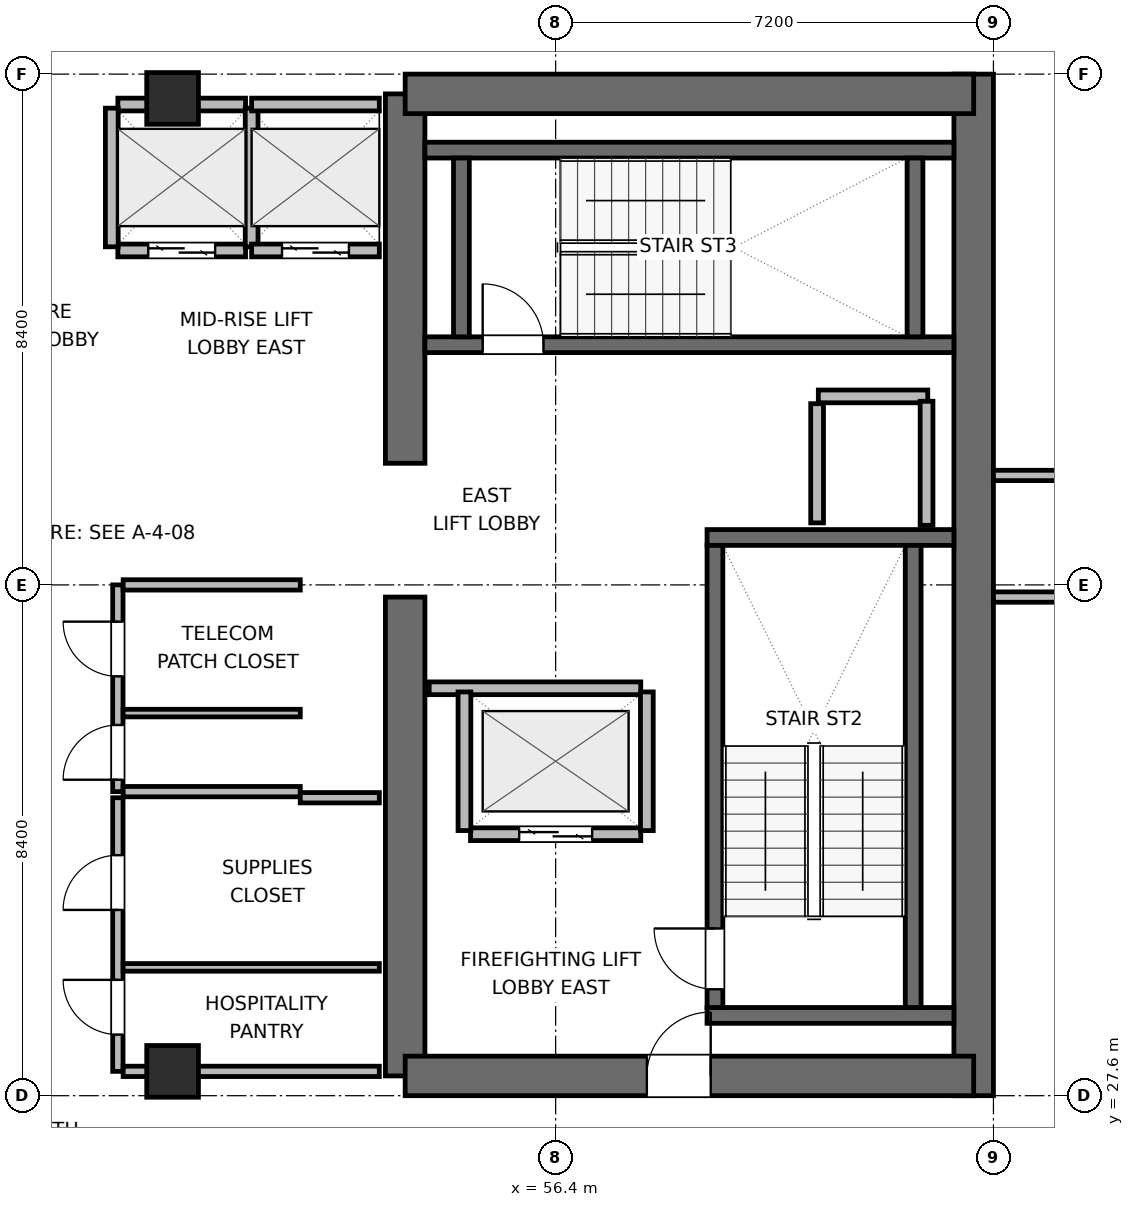
"""IFC4 building model, lengths in metres.
Left out: names, types, materials, properties, quantities, classifications, styles, units other than length and angle.
Written with IfcOpenShell. Run it as: python <this file> out.ifc"""

import sys

from ifc_helpers import new_model, si_unit, direction, frame, frame_2d, origin, origin_2d, place, context, subcontext, project, spatial, rectangle, extrude, element, fill, save


model = new_model("IFC4")
c1 = context("Model", 3, precision=1e-05, world=origin(), true_north=direction((0.0, 1.0)))
c2 = subcontext(c1, "Body", "Model", "MODEL_VIEW")
j1 = project(units=[si_unit("LENGTHUNIT", "METRE"), si_unit("PLANEANGLEUNIT", "RADIAN")], contexts=[c1])
p1 = place(None, origin())
s1 = spatial("IfcSite", under=j1, at=p1, CompositionType="ELEMENT")
p2 = place(p1, origin())
s2 = spatial("IfcBuilding", under=s1, at=p2, CompositionType="ELEMENT")
p3 = place(p2, frame((0.0, 0.0, 201.9)))
s3 = spatial("IfcBuildingStorey", under=s2, at=p3, CompositionType="ELEMENT", Elevation=201.9)
p4 = place(p3, frame((53.925, 27.925, 0.0), z_axis=(0.0, 0.0, 1.0), x_axis=(0.0, 1.0, 0.0)))
e1 = element("IfcWall", 1, at=p4, inside=s3, PredefinedType="SHEAR", context=c2, shape_type="SweptSolid", body=[
    extrude(rectangle(XDim=7.875, YDim=0.65, at=frame_2d((3.938, 0.0))), origin(), (0.0, 0.0, 1.0), 3.9),
])
p5 = place(p3, frame((53.925, 38.0, 0.0), z_axis=(0.0, 0.0, 1.0), x_axis=(0.0, 1.0, 0.0)))
e2 = element("IfcWall", 2, at=p5, inside=s3, PredefinedType="SHEAR", context=c2, shape_type="SweptSolid", body=[
    extrude(rectangle(XDim=6.075, YDim=0.65, at=frame_2d((3.038, 0.0))), origin(), (0.0, 0.0, 1.0), 3.9),
])
p6 = place(p3, frame((63.275, 27.6, 0.0), z_axis=(0.0, 0.0, 1.0), x_axis=(0.0, 1.0, 0.0)))
e3 = element("IfcWall", 3, at=p6, inside=s3, PredefinedType="SHEAR", context=c2, shape_type="SweptSolid", body=[
    extrude(rectangle(XDim=16.8, YDim=0.65, at=frame_2d((8.4, 0.0))), origin(), (0.0, 0.0, 1.0), 3.9),
])
p7 = place(p3, frame((53.925, 27.925, 0.0), z_axis=(0.0, 0.0, 1.0), x_axis=(1.0, 0.0, 0.0)))
e4 = element("IfcWall", 4, at=p7, inside=s3, PredefinedType="SHEAR", context=c2, shape_type="SweptSolid", body=[
    extrude(rectangle(XDim=9.35, YDim=0.65, at=frame_2d((4.675, 0.0))), origin(), (0.0, 0.0, 1.0), 3.9),
])
p8 = place(p7, frame((3.975, 0.0, 0.0)))
e5 = element("IfcOpeningElement", 5, at=p8, cuts=e4, PredefinedType="OPENING", context=c2, shape_type="SweptSolid", body=[
    extrude(rectangle(XDim=1.05, YDim=2.04, at=frame_2d((0.525, 1.02))), frame((0.0, 0.335, 0.0), z_axis=(0.0, -1.0, 0.0), x_axis=(1.0, 0.0, 0.0)), (0.0, 0.0, 1.0), 0.67),
])
p9 = place(p3, frame((53.925, 44.075, 0.0), z_axis=(0.0, 0.0, 1.0), x_axis=(1.0, 0.0, 0.0)))
e6 = element("IfcWall", 6, at=p9, inside=s3, PredefinedType="SHEAR", context=c2, shape_type="SweptSolid", body=[
    extrude(rectangle(XDim=9.35, YDim=0.65, at=frame_2d((4.675, 0.0))), origin(), (0.0, 0.0, 1.0), 3.9),
])
for number, where, z_axis, x_axis in (
    (7, (58.89, 28.92, 0.0), (0.0, 0.0, 1.0), (1.0, 0.0, 0.0)),
    (8, (58.89, 36.78, 0.0), (0.0, 0.0, 1.0), (1.0, 0.0, 0.0)),
):
    element("IfcWall", number, at=place(p3, frame(where, z_axis=z_axis, x_axis=x_axis)), inside=s3, PredefinedType="SHEAR", context=c2, shape_type="SweptSolid", body=[
        extrude(rectangle(XDim=4.06, YDim=0.26, at=frame_2d((2.03, 0.0))), origin(), (0.0, 0.0, 1.0), 3.9),
    ])
p10 = place(p3, frame((59.02, 29.05, 0.0), z_axis=(0.0, 0.0, 1.0), x_axis=(0.0, 1.0, 0.0)))
e9 = element("IfcWall", 9, at=p10, inside=s3, PredefinedType="SHEAR", context=c2, shape_type="SweptSolid", body=[
    extrude(rectangle(XDim=7.6, YDim=0.26, at=frame_2d((3.8, 0.0))), origin(), (0.0, 0.0, 1.0), 3.9),
])
p11 = place(p10, frame((0.3, 0.0, 0.0)))
e10 = element("IfcOpeningElement", 10, at=p11, cuts=e9, PredefinedType="OPENING", context=c2, shape_type="SweptSolid", body=[
    extrude(rectangle(XDim=1.0, YDim=2.04, at=frame_2d((0.5, 1.02))), frame((0.0, 0.14, 0.0), z_axis=(0.0, -1.0, 0.0), x_axis=(1.0, 0.0, 0.0)), (0.0, 0.0, 1.0), 0.28),
])
p12 = place(p3, frame((62.28, 29.05, 0.0), z_axis=(0.0, 0.0, 1.0), x_axis=(0.0, 1.0, 0.0)))
e11 = element("IfcWall", 11, at=p12, inside=s3, PredefinedType="SHEAR", context=c2, shape_type="SweptSolid", body=[
    extrude(rectangle(XDim=7.6, YDim=0.26, at=frame_2d((3.8, 0.0))), origin(), (0.0, 0.0, 1.0), 3.9),
])
p13 = place(p3, frame((54.25, 39.95, 0.0), z_axis=(0.0, 0.0, 1.0), x_axis=(1.0, 0.0, 0.0)))
e12 = element("IfcWall", 12, at=p13, inside=s3, PredefinedType="SHEAR", context=c2, shape_type="SweptSolid", body=[
    extrude(rectangle(XDim=8.7, YDim=0.26, at=frame_2d((4.35, 0.0))), origin(), (0.0, 0.0, 1.0), 3.9),
])
p14 = place(p13, frame((0.95, 0.0, 0.0)))
e13 = element("IfcOpeningElement", 13, at=p14, cuts=e12, PredefinedType="OPENING", context=c2, shape_type="SweptSolid", body=[
    extrude(rectangle(XDim=1.0, YDim=2.04, at=frame_2d((0.5, 1.02))), frame((0.0, 0.14, 0.0), z_axis=(0.0, -1.0, 0.0), x_axis=(1.0, 0.0, 0.0)), (0.0, 0.0, 1.0), 0.28),
])
p15 = place(p3, frame((54.25, 43.15, 0.0), z_axis=(0.0, 0.0, 1.0), x_axis=(1.0, 0.0, 0.0)))
e14 = element("IfcWall", 14, at=p15, inside=s3, PredefinedType="SHEAR", context=c2, shape_type="SweptSolid", body=[
    extrude(rectangle(XDim=8.7, YDim=0.26, at=frame_2d((4.35, 0.0))), origin(), (0.0, 0.0, 1.0), 3.9),
])
for number, where, z_axis, x_axis in (
    (15, (54.85, 40.08, 0.0), (0.0, 0.0, 1.0), (0.0, 1.0, 0.0)),
    (16, (62.31, 40.08, 0.0), (0.0, 0.0, 1.0), (0.0, 1.0, 0.0)),
):
    element("IfcWall", number, at=place(p3, frame(where, z_axis=z_axis, x_axis=x_axis)), inside=s3, PredefinedType="SHEAR", context=c2, shape_type="SweptSolid", body=[
        extrude(rectangle(XDim=2.94, YDim=0.26, at=frame_2d((1.47, 0.0))), origin(), (0.0, 0.0, 1.0), 3.9),
    ])
for number, where, z_axis, x_axis in (
    (17, (50.1, 28.0, 0.0), (0.0, 0.0, 1.0), (1.0, 0.0, 0.0)),
    (18, (50.1, 44.0, 0.0), (0.0, 0.0, 1.0), (1.0, 0.0, 0.0)),
):
    element("IfcColumn", number, at=place(p3, frame(where, z_axis=z_axis, x_axis=x_axis)), inside=s3, PredefinedType="COLUMN", context=c2, shape_type="SweptSolid", body=[
        extrude(rectangle(XDim=0.85, YDim=0.85, at=origin_2d()), origin(), (0.0, 0.0, 1.0), 3.9),
    ])
p16 = place(p3, frame((60.72, 39.1, 0.0), z_axis=(0.0, 0.0, 1.0), x_axis=(1.0, 0.0, 0.0)))
e19 = element("IfcWall", 19, at=p16, inside=s3, PredefinedType="PARTITIONING", context=c2, shape_type="SweptSolid", body=[
    extrude(rectangle(XDim=1.8, YDim=0.21, at=frame_2d((0.9, 0.0))), origin(), (0.0, 0.0, 1.0), 3.68),
])
p17 = place(p3, frame((60.7, 37.02, 0.0), z_axis=(0.0, 0.0, 1.0), x_axis=(0.0, 1.0, 0.0)))
e20 = element("IfcWall", 20, at=p17, inside=s3, PredefinedType="PARTITIONING", context=c2, shape_type="SweptSolid", body=[
    extrude(rectangle(XDim=1.96, YDim=0.21, at=frame_2d((0.98, 0.0))), origin(), (0.0, 0.0, 1.0), 3.68),
])
p18 = place(p3, frame((62.5, 36.98, 0.0), z_axis=(0.0, 0.0, 1.0), x_axis=(0.0, 1.0, 0.0)))
e21 = element("IfcWall", 21, at=p18, inside=s3, PredefinedType="PARTITIONING", context=c2, shape_type="SweptSolid", body=[
    extrude(rectangle(XDim=2.04, YDim=0.21, at=frame_2d((1.02, 0.0))), origin(), (0.0, 0.0, 1.0), 3.68),
])
p19 = place(p3, frame((55.0, 31.9, 0.0), z_axis=(0.0, 0.0, 1.0), x_axis=(1.0, 0.0, 0.0)))
e22 = element("IfcWall", 22, at=p19, inside=s3, PredefinedType="PARTITIONING", context=c2, shape_type="SweptSolid", body=[
    extrude(rectangle(XDim=2.8, YDim=0.21, at=frame_2d((1.4, 0.0))), origin(), (0.0, 0.0, 1.0), 3.68),
])
p20 = place(p19, frame((0.8, 0.0, 0.0)))
e23 = element("IfcOpeningElement", 23, at=p20, cuts=e22, PredefinedType="OPENING", context=c2, shape_type="SweptSolid", body=[
    extrude(rectangle(XDim=1.2, YDim=2.04, at=frame_2d((0.6, 1.02))), frame((0.0, 0.115, 0.0), z_axis=(0.0, -1.0, 0.0), x_axis=(1.0, 0.0, 0.0)), (0.0, 0.0, 1.0), 0.23),
])
p21 = place(p3, frame((54.32, 34.3, 0.0), z_axis=(0.0, 0.0, 1.0), x_axis=(1.0, 0.0, 0.0)))
e24 = element("IfcWall", 24, at=p21, inside=s3, PredefinedType="PARTITIONING", context=c2, shape_type="SweptSolid", body=[
    extrude(rectangle(XDim=3.48, YDim=0.21, at=frame_2d((1.74, 0.0))), origin(), (0.0, 0.0, 1.0), 3.68),
])
for number, where, z_axis, x_axis in (
    (25, (54.9, 31.96, 0.0), (0.0, 0.0, 1.0), (0.0, 1.0, 0.0)),
    (26, (57.9, 31.96, 0.0), (0.0, 0.0, 1.0), (0.0, 1.0, 0.0)),
):
    element("IfcWall", number, at=place(p3, frame(where, z_axis=z_axis, x_axis=x_axis)), inside=s3, PredefinedType="PARTITIONING", context=c2, shape_type="SweptSolid", body=[
        extrude(rectangle(XDim=2.28, YDim=0.21, at=frame_2d((1.14, 0.0))), origin(), (0.0, 0.0, 1.0), 3.68),
    ])
p22 = place(p3, frame((49.2, 41.5, 0.0), z_axis=(0.0, 0.0, 1.0), x_axis=(1.0, 0.0, 0.0)))
e27 = element("IfcWall", 27, at=p22, inside=s3, PredefinedType="PARTITIONING", context=c2, shape_type="SweptSolid", body=[
    extrude(rectangle(XDim=2.1, YDim=0.21, at=frame_2d((1.05, 0.0))), origin(), (0.0, 0.0, 1.0), 3.68),
])
p23 = place(p22, frame((0.5, 0.0, 0.0)))
e28 = element("IfcOpeningElement", 28, at=p23, cuts=e27, PredefinedType="OPENING", context=c2, shape_type="SweptSolid", body=[
    extrude(rectangle(XDim=1.1, YDim=2.04, at=frame_2d((0.55, 1.02))), frame((0.0, 0.115, 0.0), z_axis=(0.0, -1.0, 0.0), x_axis=(1.0, 0.0, 0.0)), (0.0, 0.0, 1.0), 0.23),
])
p24 = place(p3, frame((49.2, 43.9, 0.0), z_axis=(0.0, 0.0, 1.0), x_axis=(1.0, 0.0, 0.0)))
e29 = element("IfcWall", 29, at=p24, inside=s3, PredefinedType="PARTITIONING", context=c2, shape_type="SweptSolid", body=[
    extrude(rectangle(XDim=2.1, YDim=0.21, at=frame_2d((1.05, 0.0))), origin(), (0.0, 0.0, 1.0), 2.765),
])
for number, where, z_axis, x_axis in (
    (30, (49.1, 41.56, 0.0), (0.0, 0.0, 1.0), (0.0, 1.0, 0.0)),
    (31, (51.4, 41.56, 0.0), (0.0, 0.0, 1.0), (0.0, 1.0, 0.0)),
):
    element("IfcWall", number, at=place(p3, frame(where, z_axis=z_axis, x_axis=x_axis)), inside=s3, PredefinedType="PARTITIONING", context=c2, shape_type="SweptSolid", body=[
        extrude(rectangle(XDim=2.28, YDim=0.21, at=frame_2d((1.14, 0.0))), origin(), (0.0, 0.0, 1.0), 3.68),
    ])
p25 = place(p3, frame((51.4, 41.5, 0.0), z_axis=(0.0, 0.0, 1.0), x_axis=(1.0, 0.0, 0.0)))
e32 = element("IfcWall", 32, at=p25, inside=s3, PredefinedType="PARTITIONING", context=c2, shape_type="SweptSolid", body=[
    extrude(rectangle(XDim=2.1, YDim=0.21, at=frame_2d((1.05, 0.0))), origin(), (0.0, 0.0, 1.0), 3.68),
])
p26 = place(p25, frame((0.5, 0.0, 0.0)))
e33 = element("IfcOpeningElement", 33, at=p26, cuts=e32, PredefinedType="OPENING", context=c2, shape_type="SweptSolid", body=[
    extrude(rectangle(XDim=1.1, YDim=2.04, at=frame_2d((0.55, 1.02))), frame((0.0, 0.115, 0.0), z_axis=(0.0, -1.0, 0.0), x_axis=(1.0, 0.0, 0.0)), (0.0, 0.0, 1.0), 0.23),
])
p27 = place(p3, frame((51.4, 43.9, 0.0), z_axis=(0.0, 0.0, 1.0), x_axis=(1.0, 0.0, 0.0)))
e34 = element("IfcWall", 34, at=p27, inside=s3, PredefinedType="PARTITIONING", context=c2, shape_type="SweptSolid", body=[
    extrude(rectangle(XDim=2.1, YDim=0.21, at=frame_2d((1.05, 0.0))), origin(), (0.0, 0.0, 1.0), 2.765),
])
p28 = place(p3, frame((49.2, 32.6, 0.0), z_axis=(0.0, 0.0, 1.0), x_axis=(0.0, 1.0, 0.0)))
e35 = element("IfcWall", 35, at=p28, inside=s3, PredefinedType="PARTITIONING", context=c2, shape_type="SweptSolid", body=[
    extrude(rectangle(XDim=3.4, YDim=0.17, at=frame_2d((1.7, 0.0))), origin(), (0.0, 0.0, 1.0), 3.68),
])
p29 = place(p28, frame((0.196, 0.0, 0.0)))
e36 = element("IfcOpeningElement", 36, at=p29, cuts=e35, PredefinedType="OPENING", context=c2, shape_type="SweptSolid", body=[
    extrude(rectangle(XDim=0.9, YDim=2.02, at=frame_2d((0.45, 1.01))), frame((0.0, 0.095, 0.0), z_axis=(0.0, -1.0, 0.0), x_axis=(1.0, 0.0, 0.0)), (0.0, 0.0, 1.0), 0.19),
])
p30 = place(p28, frame((1.896, 0.0, 0.0)))
e37 = element("IfcOpeningElement", 37, at=p30, cuts=e35, PredefinedType="OPENING", context=c2, shape_type="SweptSolid", body=[
    extrude(rectangle(XDim=0.9, YDim=2.02, at=frame_2d((0.45, 1.01))), frame((0.0, 0.095, 0.0), z_axis=(0.0, -1.0, 0.0), x_axis=(1.0, 0.0, 0.0)), (0.0, 0.0, 1.0), 0.19),
])
for number, where, z_axis, x_axis in (
    (38, (49.287, 32.6, 0.0), (0.0, 0.0, 1.0), (1.0, 0.0, 0.0)),
    (39, (49.287, 36.0, 0.0), (0.0, 0.0, 1.0), (1.0, 0.0, 0.0)),
):
    element("IfcWall", number, at=place(p3, frame(where, z_axis=z_axis, x_axis=x_axis)), inside=s3, PredefinedType="PARTITIONING", context=c2, shape_type="SweptSolid", body=[
        extrude(rectangle(XDim=2.913, YDim=0.17, at=frame_2d((1.457, 0.0))), origin(), (0.0, 0.0, 1.0), 3.68),
    ])
p31 = place(p3, frame((49.287, 33.892, 0.0), z_axis=(0.0, 0.0, 1.0), x_axis=(1.0, 0.0, 0.0)))
e40 = element("IfcWall", 40, at=p31, inside=s3, PredefinedType="PARTITIONING", context=c2, shape_type="SweptSolid", body=[
    extrude(rectangle(XDim=2.913, YDim=0.125, at=frame_2d((1.457, 0.0))), origin(), (0.0, 0.0, 1.0), 3.68),
])
p32 = place(p3, frame((49.2, 28.0, 0.0), z_axis=(0.0, 0.0, 1.0), x_axis=(0.0, 1.0, 0.0)))
e41 = element("IfcWall", 41, at=p32, inside=s3, PredefinedType="PARTITIONING", context=c2, shape_type="SweptSolid", body=[
    extrude(rectangle(XDim=4.5, YDim=0.17, at=frame_2d((2.25, 0.0))), origin(), (0.0, 0.0, 1.0), 3.68),
])
p33 = place(p32, frame((0.605, 0.0, 0.0)))
e42 = element("IfcOpeningElement", 42, at=p33, cuts=e41, PredefinedType="OPENING", context=c2, shape_type="SweptSolid", body=[
    extrude(rectangle(XDim=0.9, YDim=2.02, at=frame_2d((0.45, 1.01))), frame((0.0, 0.095, 0.0), z_axis=(0.0, -1.0, 0.0), x_axis=(1.0, 0.0, 0.0)), (0.0, 0.0, 1.0), 0.19),
])
p34 = place(p32, frame((2.655, 0.0, 0.0)))
e43 = element("IfcOpeningElement", 43, at=p34, cuts=e41, PredefinedType="OPENING", context=c2, shape_type="SweptSolid", body=[
    extrude(rectangle(XDim=0.9, YDim=2.02, at=frame_2d((0.45, 1.01))), frame((0.0, 0.095, 0.0), z_axis=(0.0, -1.0, 0.0), x_axis=(1.0, 0.0, 0.0)), (0.0, 0.0, 1.0), 0.19),
])
p35 = place(p3, frame((49.287, 28.0, 0.0), z_axis=(0.0, 0.0, 1.0), x_axis=(1.0, 0.0, 0.0)))
e44 = element("IfcWall", 44, at=p35, inside=s3, PredefinedType="PARTITIONING", context=c2, shape_type="SweptSolid", body=[
    extrude(rectangle(XDim=4.213, YDim=0.17, at=frame_2d((2.106, 0.0))), origin(), (0.0, 0.0, 1.0), 2.765),
])
p36 = place(p3, frame((52.2, 32.5, 0.0), z_axis=(0.0, 0.0, 1.0), x_axis=(1.0, 0.0, 0.0)))
e45 = element("IfcWall", 45, at=p36, inside=s3, PredefinedType="PARTITIONING", context=c2, shape_type="SweptSolid", body=[
    extrude(rectangle(XDim=1.3, YDim=0.17, at=frame_2d((0.65, 0.0))), origin(), (0.0, 0.0, 1.0), 3.68),
])
p37 = place(p3, frame((49.287, 29.71, 0.0), z_axis=(0.0, 0.0, 1.0), x_axis=(1.0, 0.0, 0.0)))
e46 = element("IfcWall", 46, at=p37, inside=s3, PredefinedType="PARTITIONING", context=c2, shape_type="SweptSolid", body=[
    extrude(rectangle(XDim=4.213, YDim=0.125, at=frame_2d((2.106, 0.0))), origin(), (0.0, 0.0, 1.0), 3.68),
])
p38 = place(p3, frame((63.6, 35.8, 0.0), z_axis=(0.0, 0.0, 1.0), x_axis=(1.0, 0.0, 0.0)))
e47 = element("IfcWall", 47, at=p38, inside=s3, PredefinedType="PARTITIONING", context=c2, shape_type="SweptSolid", body=[
    extrude(rectangle(XDim=6.975, YDim=0.17, at=frame_2d((3.487, 0.0))), origin(), (0.0, 0.0, 1.0), 3.043),
])
p39 = place(p38, frame((1.1, 0.0, 0.0)))
e48 = element("IfcOpeningElement", 48, at=p39, cuts=e47, PredefinedType="OPENING", context=c2, shape_type="SweptSolid", body=[
    extrude(rectangle(XDim=0.95, YDim=2.04, at=frame_2d((0.475, 1.02))), frame((0.0, 0.095, 0.0), z_axis=(0.0, -1.0, 0.0), x_axis=(1.0, 0.0, 0.0)), (0.0, 0.0, 1.0), 0.19),
])
p40 = place(p3, frame((63.6, 37.8, 0.0), z_axis=(0.0, 0.0, 1.0), x_axis=(1.0, 0.0, 0.0)))
e49 = element("IfcWall", 49, at=p40, inside=s3, PredefinedType="PARTITIONING", context=c2, shape_type="SweptSolid", body=[
    extrude(rectangle(XDim=4.96, YDim=0.17, at=frame_2d((2.48, 0.0))), origin(), (0.0, 0.0, 1.0), 3.68),
])
p41 = place(p40, frame((1.1, 0.0, 0.0)))
e50 = element("IfcOpeningElement", 50, at=p41, cuts=e49, PredefinedType="OPENING", context=c2, shape_type="SweptSolid", body=[
    extrude(rectangle(XDim=0.95, YDim=2.04, at=frame_2d((0.475, 1.02))), frame((0.0, 0.095, 0.0), z_axis=(0.0, -1.0, 0.0), x_axis=(1.0, 0.0, 0.0)), (0.0, 0.0, 1.0), 0.19),
])
p42 = place(p11, origin())
e51 = element("IfcDoor", 51, at=p42, inside=s3, OperationType="SINGLE_SWING_RIGHT", PredefinedType="DOOR", context=c2, shape_type="SweptSolid", body=[
    extrude(rectangle(XDim=1.0, YDim=2.04, at=frame_2d((0.5, 1.02))), frame((0.0, 0.025, 0.0), z_axis=(0.0, -1.0, 0.0), x_axis=(1.0, 0.0, 0.0)), (0.0, 0.0, 1.0), 0.05),
])
fill(e10, e51)
p43 = place(p14, origin())
e52 = element("IfcDoor", 52, at=p43, inside=s3, OperationType="SINGLE_SWING_LEFT", PredefinedType="DOOR", context=c2, shape_type="SweptSolid", body=[
    extrude(rectangle(XDim=1.0, YDim=2.04, at=frame_2d((0.5, 1.02))), frame((0.0, 0.025, 0.0), z_axis=(0.0, -1.0, 0.0), x_axis=(1.0, 0.0, 0.0)), (0.0, 0.0, 1.0), 0.05),
])
fill(e13, e52)
p44 = place(p20, origin())
e53 = element("IfcDoor", 53, at=p44, inside=s3, OperationType="DOUBLE_DOOR_SLIDING", PredefinedType="DOOR", context=c2, shape_type="SweptSolid", body=[
    extrude(rectangle(XDim=1.2, YDim=2.04, at=frame_2d((0.6, 1.02))), frame((0.0, 0.025, 0.0), z_axis=(0.0, -1.0, 0.0), x_axis=(1.0, 0.0, 0.0)), (0.0, 0.0, 1.0), 0.05),
])
fill(e23, e53)
p45 = place(p23, origin())
e54 = element("IfcDoor", 54, at=p45, inside=s3, OperationType="DOUBLE_DOOR_SLIDING", PredefinedType="DOOR", context=c2, shape_type="SweptSolid", body=[
    extrude(rectangle(XDim=1.1, YDim=2.04, at=frame_2d((0.55, 1.02))), frame((0.0, 0.025, 0.0), z_axis=(0.0, -1.0, 0.0), x_axis=(1.0, 0.0, 0.0)), (0.0, 0.0, 1.0), 0.05),
])
fill(e28, e54)
p46 = place(p26, origin())
e55 = element("IfcDoor", 55, at=p46, inside=s3, OperationType="DOUBLE_DOOR_SLIDING", PredefinedType="DOOR", context=c2, shape_type="SweptSolid", body=[
    extrude(rectangle(XDim=1.1, YDim=2.04, at=frame_2d((0.55, 1.02))), frame((0.0, 0.025, 0.0), z_axis=(0.0, -1.0, 0.0), x_axis=(1.0, 0.0, 0.0)), (0.0, 0.0, 1.0), 0.05),
])
fill(e33, e55)
p47 = place(p8, origin())
e56 = element("IfcDoor", 56, at=p47, inside=s3, OperationType="SINGLE_SWING_RIGHT", PredefinedType="DOOR", context=c2, shape_type="SweptSolid", body=[
    extrude(rectangle(XDim=1.05, YDim=2.04, at=frame_2d((0.525, 1.02))), frame((0.0, 0.025, 0.0), z_axis=(0.0, -1.0, 0.0), x_axis=(1.0, 0.0, 0.0)), (0.0, 0.0, 1.0), 0.05),
])
fill(e5, e56)
p48 = place(p29, origin())
e57 = element("IfcDoor", 57, at=p48, inside=s3, OperationType="SINGLE_SWING_LEFT", PredefinedType="DOOR", context=c2, shape_type="SweptSolid", body=[
    extrude(rectangle(XDim=0.9, YDim=2.02, at=frame_2d((0.45, 1.01))), frame((0.0, 0.025, 0.0), z_axis=(0.0, -1.0, 0.0), x_axis=(1.0, 0.0, 0.0)), (0.0, 0.0, 1.0), 0.05),
])
fill(e36, e57)
p49 = place(p30, origin())
e58 = element("IfcDoor", 58, at=p49, inside=s3, OperationType="SINGLE_SWING_RIGHT", PredefinedType="DOOR", context=c2, shape_type="SweptSolid", body=[
    extrude(rectangle(XDim=0.9, YDim=2.02, at=frame_2d((0.45, 1.01))), frame((0.0, 0.025, 0.0), z_axis=(0.0, -1.0, 0.0), x_axis=(1.0, 0.0, 0.0)), (0.0, 0.0, 1.0), 0.05),
])
fill(e37, e58)
p50 = place(p33, origin())
e59 = element("IfcDoor", 59, at=p50, inside=s3, OperationType="SINGLE_SWING_RIGHT", PredefinedType="DOOR", context=c2, shape_type="SweptSolid", body=[
    extrude(rectangle(XDim=0.9, YDim=2.02, at=frame_2d((0.45, 1.01))), frame((0.0, 0.025, 0.0), z_axis=(0.0, -1.0, 0.0), x_axis=(1.0, 0.0, 0.0)), (0.0, 0.0, 1.0), 0.05),
])
fill(e42, e59)
p51 = place(p34, origin())
e60 = element("IfcDoor", 60, at=p51, inside=s3, OperationType="SINGLE_SWING_LEFT", PredefinedType="DOOR", context=c2, shape_type="SweptSolid", body=[
    extrude(rectangle(XDim=0.9, YDim=2.02, at=frame_2d((0.45, 1.01))), frame((0.0, 0.025, 0.0), z_axis=(0.0, -1.0, 0.0), x_axis=(1.0, 0.0, 0.0)), (0.0, 0.0, 1.0), 0.05),
])
fill(e43, e60)
save(model, sys.argv[1])
